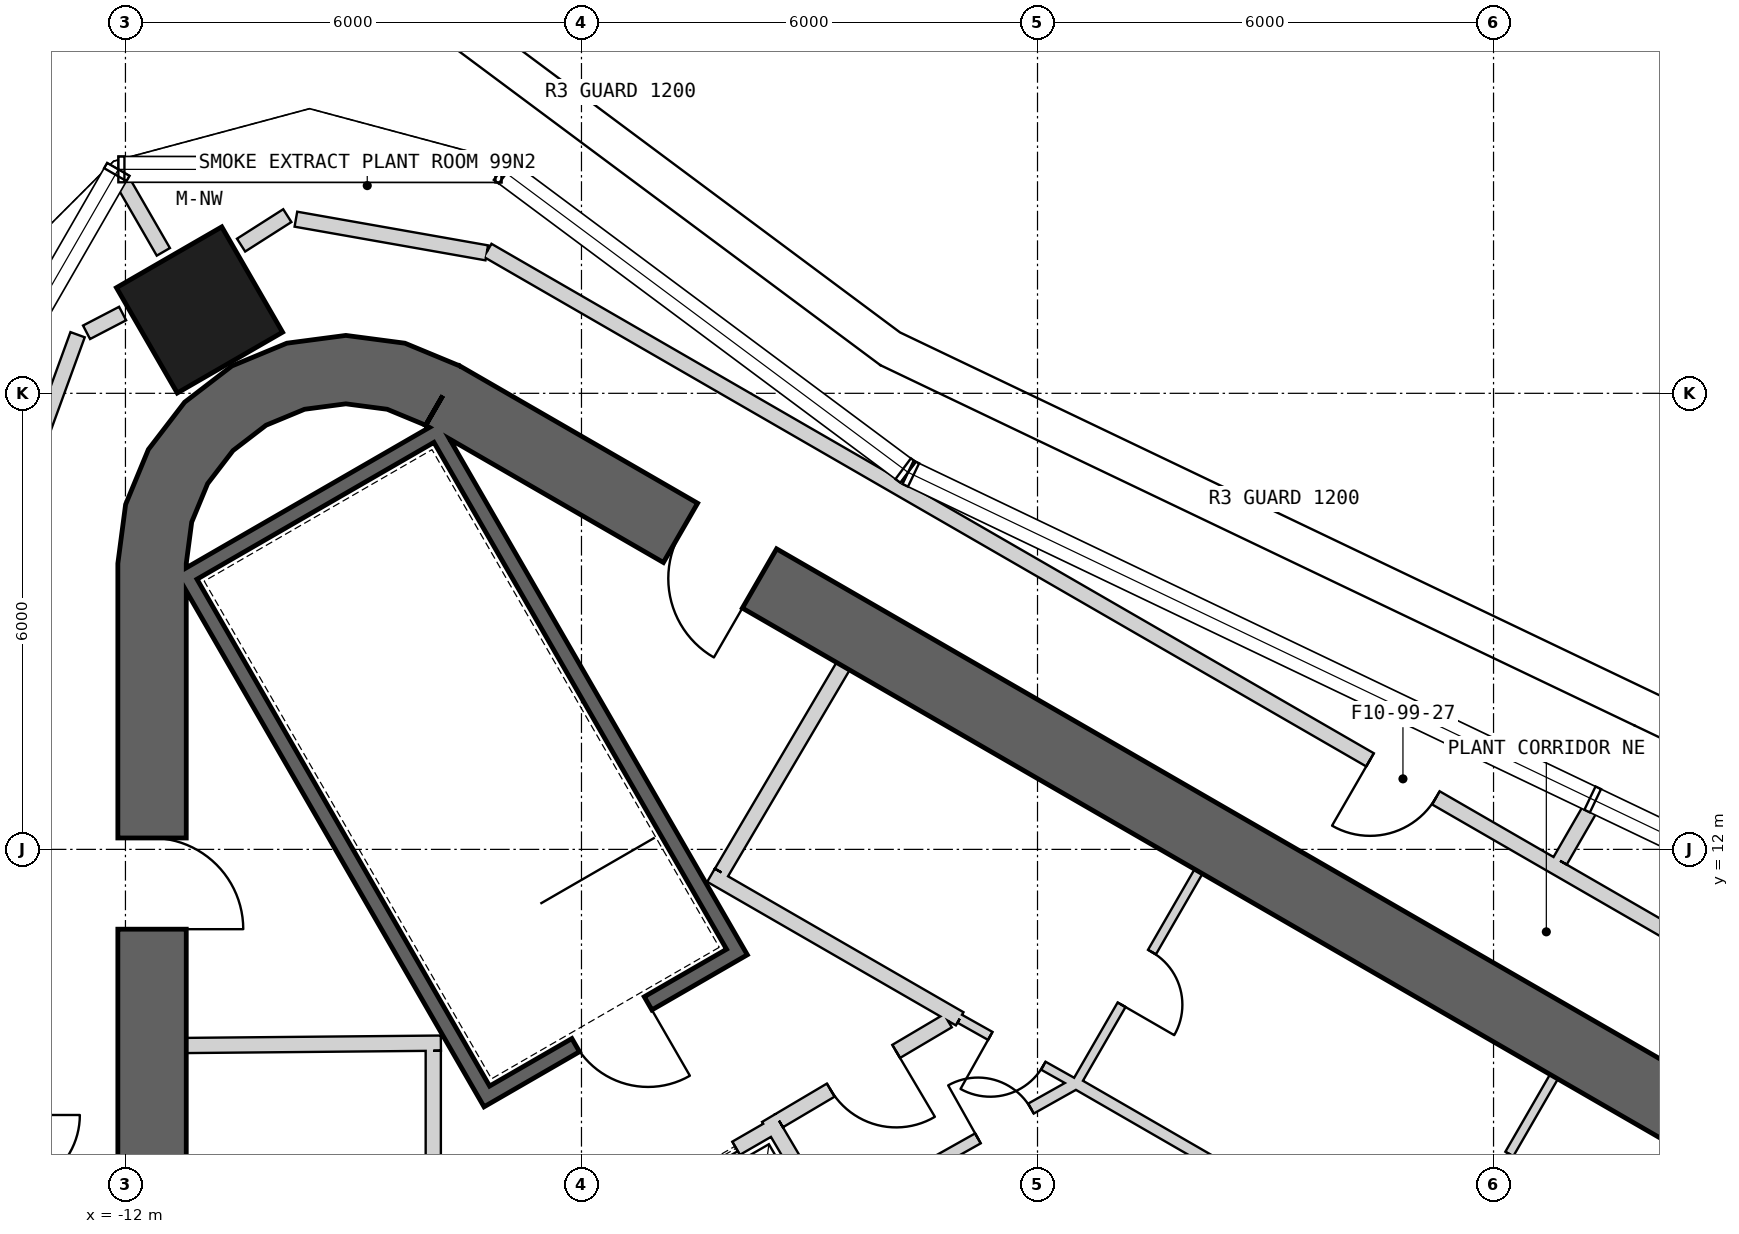
"""IFC4 building model, lengths in metres.
Left out: names, types, materials, properties, quantities, classifications, styles, units other than length and angle.
Written with IfcOpenShell. Run it as: python <this file> out.ifc"""

import sys

from ifc_helpers import new_model, si_unit, direction, frame, frame_2d, origin, origin_2d, place, context, subcontext, project, spatial, polyline, rectangle, outline, extrude, element, fill, save


model = new_model("IFC4")
c1 = context("Model", 3, precision=1e-05, world=origin(), true_north=direction((0.0, 1.0)))
c2 = subcontext(c1, "Body", "Model", "MODEL_VIEW")
j1 = project(units=[si_unit("LENGTHUNIT", "METRE"), si_unit("PLANEANGLEUNIT", "RADIAN")], contexts=[c1])
p1 = place(None, origin())
s1 = spatial("IfcSite", under=j1, at=p1, CompositionType="ELEMENT")
p2 = place(p1, origin())
s2 = spatial("IfcBuilding", under=s1, at=p2, CompositionType="ELEMENT")
p3 = place(p2, frame((0.0, 0.0, 440.3)))
s3 = spatial("IfcBuildingStorey", under=s2, at=p3, CompositionType="ELEMENT", Elevation=440.3)
p4 = place(p3, frame((-11.025, 19.097, 0.0), z_axis=(0.0, 0.0, 1.0), x_axis=(-0.5, 0.866025403784, 0.0)))
e1 = element("IfcColumn", 1, at=p4, inside=s3, PredefinedType="COLUMN", context=c2, shape_type="SweptSolid", body=[
    extrude(rectangle(XDim=1.6, YDim=1.6, at=origin_2d()), origin(), (0.0, 0.0, 1.0), 4.7),
])
p5 = place(p3, frame((19.475, 2.208, 0.0), z_axis=(0.0, 0.0, 1.0), x_axis=(-0.866028369851, 0.499994862586, 0.0)))
e2 = element("IfcWall", 2, at=p5, inside=s3, PredefinedType="SHEAR", context=c2, shape_type="SweptSolid", body=[
    extrude(rectangle(XDim=31.523, YDim=0.9, at=frame_2d((15.762, 0.0))), origin(), (0.0, 0.0, 1.0), 4.7),
])
p6 = place(p5, frame((3.612, 0.0, 0.0)))
e3 = element("IfcOpeningElement", 3, at=p6, cuts=e2, PredefinedType="OPENING", context=c2, shape_type="SweptSolid", body=[
    extrude(rectangle(XDim=1.2, YDim=2.4, at=frame_2d((0.6, 1.2))), frame((0.0, 0.46, 0.0), z_axis=(0.0, -1.0, 0.0), x_axis=(1.0, 0.0, 0.0)), (0.0, 0.0, 1.0), 0.92),
])
p7 = place(p5, frame((26.712, 0.0, 0.0)))
e4 = element("IfcOpeningElement", 4, at=p7, cuts=e2, PredefinedType="OPENING", context=c2, shape_type="SweptSolid", body=[
    extrude(rectangle(XDim=1.2, YDim=2.4, at=frame_2d((0.6, 1.2))), frame((0.0, 0.46, 0.0), z_axis=(0.0, -1.0, 0.0), x_axis=(1.0, 0.0, 0.0)), (0.0, 0.0, 1.0), 0.92),
])
p8 = place(p3, frame((-11.65, 15.762, 0.0), z_axis=(0.0, 0.0, 1.0), x_axis=(0.0, -1.0, 0.0)))
e5 = element("IfcWall", 5, at=p8, inside=s3, PredefinedType="SHEAR", context=c2, shape_type="SweptSolid", body=[
    extrude(rectangle(XDim=31.523, YDim=0.9, at=frame_2d((15.762, 0.0))), origin(), (0.0, 0.0, 1.0), 4.7),
])
p9 = place(p8, frame((3.612, 0.0, 0.0)))
e6 = element("IfcOpeningElement", 6, at=p9, cuts=e5, PredefinedType="OPENING", context=c2, shape_type="SweptSolid", body=[
    extrude(rectangle(XDim=1.2, YDim=2.4, at=frame_2d((0.6, 1.2))), frame((0.0, 0.46, 0.0), z_axis=(0.0, -1.0, 0.0), x_axis=(1.0, 0.0, 0.0)), (0.0, 0.0, 1.0), 0.92),
])
p10 = place(p8, frame((26.712, 0.0, 0.0)))
e7 = element("IfcOpeningElement", 7, at=p10, cuts=e5, PredefinedType="OPENING", context=c2, shape_type="SweptSolid", body=[
    extrude(rectangle(XDim=1.2, YDim=2.4, at=frame_2d((0.6, 1.2))), frame((0.0, 0.46, 0.0), z_axis=(0.0, -1.0, 0.0), x_axis=(1.0, 0.0, 0.0)), (0.0, 0.0, 1.0), 0.92),
])
p11 = place(p3, origin())
e8 = element("IfcWall", 8, at=p11, inside=s3, PredefinedType="SHEAR", context=c2, shape_type="SweptSolid", body=[
    extrude(outline(polyline([(-7.6, 18.36), (-8.323, 18.659), (-9.1, 18.762), (-9.876, 18.659), (-10.6, 18.36), (-11.221, 17.883), (-11.698, 17.262), (-11.998, 16.538), (-12.1, 15.762), (-11.2, 15.762), (-11.128, 16.305), (-10.919, 16.812), (-10.585, 17.247), (-10.15, 17.58), (-9.644, 17.79), (-9.1, 17.862), (-8.556, 17.79), (-8.05, 17.58), (-7.6, 18.36)])), origin(), (0.0, 0.0, 1.0), 4.7),
])
p12 = place(p3, frame((-11.245, 15.678, -0.25), z_axis=(0.0, 0.0, 1.0), x_axis=(0.499977274689, -0.866038523851, 0.0)))
e9 = element("IfcWall", 9, at=p12, inside=s3, PredefinedType="SHEAR", context=c2, shape_type="SweptSolid", body=[
    extrude(rectangle(XDim=8.1, YDim=0.2, at=frame_2d((4.05, 0.0))), origin(), (0.0, 0.0, 1.0), 4.95),
])
p13 = place(p3, frame((-7.818, 17.541, -0.25), z_axis=(0.0, 0.0, 1.0), x_axis=(-0.866044365799, -0.499967155389, 0.0)))
e10 = element("IfcWall", 10, at=p13, inside=s3, PredefinedType="SHEAR", context=c2, shape_type="SweptSolid", body=[
    extrude(rectangle(XDim=3.8, YDim=0.2, at=frame_2d((1.9, 0.0))), origin(), (0.0, 0.0, 1.0), 4.95),
])
p14 = place(p3, frame((-7.854, 17.405, -0.25), z_axis=(0.0, 0.0, 1.0), x_axis=(0.499997992926, -0.866026562566, 0.0)))
e11 = element("IfcWall", 11, at=p14, inside=s3, PredefinedType="SHEAR", context=c2, shape_type="SweptSolid", body=[
    extrude(rectangle(XDim=7.9, YDim=0.2, at=frame_2d((3.95, 0.0))), origin(), (0.0, 0.0, 1.0), 4.95),
])
p15 = place(p3, frame((-7.159, 8.8, -0.25), z_axis=(0.0, 0.0, 1.0), x_axis=(0.866047807691, 0.499961193289, 0.0)))
e12 = element("IfcWall", 12, at=p15, inside=s3, PredefinedType="SHEAR", context=c2, shape_type="SweptSolid", body=[
    extrude(rectangle(XDim=3.6, YDim=0.2, at=frame_2d((1.8, 0.0))), origin(), (0.0, 0.0, 1.0), 4.95),
])
p16 = place(p15, frame((1.25, 0.0, 0.25)))
e13 = element("IfcOpeningElement", 13, at=p16, cuts=e12, PredefinedType="OPENING", context=c2, shape_type="SweptSolid", body=[
    extrude(rectangle(XDim=1.1, YDim=2.1, at=frame_2d((0.55, 1.05))), frame((0.0, 0.11, 0.0), z_axis=(0.0, -1.0, 0.0), x_axis=(1.0, 0.0, 0.0)), (0.0, 0.0, 1.0), 0.22),
])
p17 = place(p3, frame((-5.524, 7.168, 0.0), z_axis=(0.0, 0.0, 1.0), x_axis=(0.866024647952, 0.500001309137, 0.0)))
e14 = element("IfcWall", 14, at=p17, inside=s3, PredefinedType="PLUMBINGWALL", context=c2, shape_type="SweptSolid", body=[
    extrude(rectangle(XDim=2.4, YDim=0.2, at=frame_2d((1.2, 0.0))), origin(), (0.0, 0.0, 1.0), 4.7),
])
p18 = place(p17, frame((0.6, 0.0, 0.0)))
e15 = element("IfcOpeningElement", 15, at=p18, cuts=e14, PredefinedType="OPENING", context=c2, shape_type="SweptSolid", body=[
    extrude(rectangle(XDim=1.2, YDim=2.4, at=frame_2d((0.6, 1.2))), frame((0.0, 0.11, 0.0), z_axis=(0.0, -1.0, 0.0), x_axis=(1.0, 0.0, 0.0)), (0.0, 0.0, 1.0), 0.22),
])
p19 = place(p3, frame((-3.538, 8.465, 0.0), z_axis=(0.0, 0.0, 1.0), x_axis=(0.508616218331, -0.860993346345, 0.0)))
e16 = element("IfcWall", 16, at=p19, inside=s3, PredefinedType="PLUMBINGWALL", context=c2, shape_type="SweptSolid", body=[
    extrude(rectangle(XDim=3.2, YDim=0.2, at=frame_2d((1.6, 0.0))), origin(), (0.0, 0.0, 1.0), 4.7),
])
p20 = place(p3, frame((-7.85, 9.451, 0.0), z_axis=(0.0, 0.0, 1.0), x_axis=(-0.999957167047, -0.009255488683, 0.0)))
e17 = element("IfcWall", 17, at=p20, inside=s3, PredefinedType="PARTITIONING", context=c2, shape_type="SweptSolid", body=[
    extrude(rectangle(XDim=3.35, YDim=0.2, at=frame_2d((1.675, 0.0))), origin(), (0.0, 0.0, 1.0), 4.7),
])
p21 = place(p3, frame((-7.95, 5.772, 0.0), z_axis=(0.0, 0.0, 1.0), x_axis=(0.0, 1.0, 0.0)))
e18 = element("IfcWall", 18, at=p21, inside=s3, PredefinedType="PARTITIONING", context=c2, shape_type="SweptSolid", body=[
    extrude(rectangle(XDim=3.578, YDim=0.2, at=frame_2d((1.789, 0.0))), origin(), (0.0, 0.0, 1.0), 4.7),
])
p22 = place(p21, frame((1.389, 0.0, 0.0)))
e19 = element("IfcOpeningElement", 19, at=p22, cuts=e18, PredefinedType="OPENING", context=c2, shape_type="SweptSolid", body=[
    extrude(rectangle(XDim=0.8, YDim=2.1, at=frame_2d((0.4, 1.05))), frame((0.0, 0.11, 0.0), z_axis=(0.0, -1.0, 0.0), x_axis=(1.0, 0.0, 0.0)), (0.0, 0.0, 1.0), 0.22),
])
p23 = place(p3, frame((6.795, 9.01, 0.0), z_axis=(0.0, 0.0, 1.0), x_axis=(-0.499984717929, -0.866034226713, 0.0)))
e20 = element("IfcWall", 20, at=p23, inside=s3, PredefinedType="PARTITIONING", context=c2, shape_type="SweptSolid", body=[
    extrude(rectangle(XDim=3.25, YDim=0.12, at=frame_2d((1.625, 0.0))), origin(), (0.0, 0.0, 1.0), 4.7),
])
p24 = place(p23, frame((1.175, 0.0, 0.0)))
e21 = element("IfcOpeningElement", 21, at=p24, cuts=e20, PredefinedType="OPENING", context=c2, shape_type="SweptSolid", body=[
    extrude(rectangle(XDim=0.9, YDim=2.1, at=frame_2d((0.45, 1.05))), frame((0.0, 0.07, 0.0), z_axis=(0.0, -1.0, 0.0), x_axis=(1.0, 0.0, 0.0)), (0.0, 0.0, 1.0), 0.14),
])
p25 = place(p3, frame((-4.296, 11.66, 0.0), z_axis=(0.0, 0.0, 1.0), x_axis=(0.866027389382, -0.499996560828, 0.0)))
e22 = element("IfcWall", 22, at=p25, inside=s3, PredefinedType="PARTITIONING", context=c2, shape_type="SweptSolid", body=[
    extrude(rectangle(XDim=3.778, YDim=0.2, at=frame_2d((1.889, 0.0))), origin(), (0.0, 0.0, 1.0), 4.7),
])
p26 = place(p3, frame((2.119, 11.709, 0.0), z_axis=(0.0, 0.0, 1.0), x_axis=(-0.500017246033, -0.866015446554, 0.0)))
e23 = element("IfcWall", 23, at=p26, inside=s3, PredefinedType="PARTITIONING", context=c2, shape_type="SweptSolid", body=[
    extrude(rectangle(XDim=3.25, YDim=0.12, at=frame_2d((1.625, 0.0))), origin(), (0.0, 0.0, 1.0), 4.7),
])
p27 = place(p26, frame((1.225, 0.0, 0.0)))
e24 = element("IfcOpeningElement", 24, at=p27, cuts=e23, PredefinedType="OPENING", context=c2, shape_type="SweptSolid", body=[
    extrude(rectangle(XDim=0.8, YDim=2.1, at=frame_2d((0.4, 1.05))), frame((0.0, 0.07, 0.0), z_axis=(0.0, -1.0, 0.0), x_axis=(1.0, 0.0, 0.0)), (0.0, 0.0, 1.0), 0.14),
])
p28 = place(p3, frame((5.159, 6.236, 0.0), z_axis=(0.0, 0.0, 1.0), x_axis=(-0.866028230842, 0.499995103361, 0.0)))
e25 = element("IfcWall", 25, at=p28, inside=s3, PredefinedType="PLUMBINGWALL", context=c2, shape_type="SweptSolid", body=[
    extrude(rectangle(XDim=5.4, YDim=0.15, at=frame_2d((2.7, 0.0))), origin(), (0.0, 0.0, 1.0), 4.7),
])
p29 = place(p28, frame((2.3, 0.0, 0.0)))
e26 = element("IfcOpeningElement", 26, at=p29, cuts=e25, PredefinedType="OPENING", context=c2, shape_type="SweptSolid", body=[
    extrude(rectangle(XDim=0.8, YDim=2.1, at=frame_2d((0.4, 1.05))), frame((0.0, 0.085, 0.0), z_axis=(0.0, -1.0, 0.0), x_axis=(1.0, 0.0, 0.0)), (0.0, 0.0, 1.0), 0.17),
])
p30 = place(p3, frame((-2.558, 14.409, 0.0), z_axis=(0.0, 0.0, 1.0), x_axis=(-0.508018930956, -0.861345903683, 0.0)))
e27 = element("IfcWall", 27, at=p30, inside=s3, PredefinedType="PARTITIONING", context=c2, shape_type="SweptSolid", body=[
    extrude(rectangle(XDim=3.15, YDim=0.2, at=frame_2d((1.575, 0.0))), origin(), (0.0, 0.0, 1.0), 4.7),
])
p31 = place(p3, frame((-1.024, 9.772, 0.0), z_axis=(0.0, 0.0, 1.0), x_axis=(0.871968924608, -0.489561226527, 0.0)))
e28 = element("IfcWall", 28, at=p31, inside=s3, PredefinedType="PARTITIONING", context=c2, shape_type="SweptSolid", body=[
    extrude(rectangle(XDim=1.722, YDim=0.12, at=frame_2d((0.861, 0.0))), origin(), (0.0, 0.0, 1.0), 4.7),
])
p32 = place(p31, frame((0.461, 0.0, 0.0)))
e29 = element("IfcOpeningElement", 29, at=p32, cuts=e28, PredefinedType="OPENING", context=c2, shape_type="SweptSolid", body=[
    extrude(rectangle(XDim=0.8, YDim=2.1, at=frame_2d((0.4, 1.05))), frame((0.0, 0.07, 0.0), z_axis=(0.0, -1.0, 0.0), x_axis=(1.0, 0.0, 0.0)), (0.0, 0.0, 1.0), 0.14),
])
p33 = place(p3, frame((-1.179, 9.745, 0.0), z_axis=(0.0, 0.0, 1.0), x_axis=(-0.860630814782, -0.509229418482, 0.0)))
e30 = element("IfcWall", 30, at=p33, inside=s3, PredefinedType="PARTITIONING", context=c2, shape_type="SweptSolid", body=[
    extrude(rectangle(XDim=2.582, YDim=0.2, at=frame_2d((1.291, 0.0))), origin(), (0.0, 0.0, 1.0), 4.7),
])
p34 = place(p33, frame((0.791, 0.0, 0.0)))
e31 = element("IfcOpeningElement", 31, at=p34, cuts=e30, PredefinedType="OPENING", context=c2, shape_type="SweptSolid", body=[
    extrude(rectangle(XDim=1.0, YDim=2.1, at=frame_2d((0.5, 1.05))), frame((0.0, 0.11, 0.0), z_axis=(0.0, -1.0, 0.0), x_axis=(1.0, 0.0, 0.0)), (0.0, 0.0, 1.0), 0.22),
])
p35 = place(p3, frame((0.475, 8.905, 0.0), z_axis=(0.0, 0.0, 1.0), x_axis=(-0.871859457225, -0.489756150392, 0.0)))
e32 = element("IfcWall", 32, at=p35, inside=s3, PredefinedType="PLUMBINGWALL", context=c2, shape_type="SweptSolid", body=[
    extrude(rectangle(XDim=2.089, YDim=0.15, at=frame_2d((1.044, 0.0))), origin(), (0.0, 0.0, 1.0), 4.7),
])
p36 = place(p35, frame((0.644, 0.0, 0.0)))
e33 = element("IfcOpeningElement", 33, at=p36, cuts=e32, PredefinedType="OPENING", context=c2, shape_type="SweptSolid", body=[
    extrude(rectangle(XDim=0.8, YDim=2.1, at=frame_2d((0.4, 1.05))), frame((0.0, 0.085, 0.0), z_axis=(0.0, -1.0, 0.0), x_axis=(1.0, 0.0, 0.0)), (0.0, 0.0, 1.0), 0.17),
])
p37 = place(p3, frame((-12.63, 18.771, 0.0), z_axis=(0.0, 0.0, 1.0), x_axis=(-0.342015224264, -0.939694411163, 0.0)))
e34 = element("IfcWall", 34, at=p37, inside=s3, PredefinedType="PARTITIONING", context=c2, shape_type="SweptSolid", body=[
    extrude(rectangle(XDim=2.737, YDim=0.2, at=frame_2d((1.368, 0.0))), origin(), (0.0, 0.0, 1.0), 4.7),
])
p38 = place(p3, frame((-12.038, 19.05, 0.0), z_axis=(0.0, 0.0, 1.0), x_axis=(-0.887186880255, -0.461410272429, 0.0)))
e35 = element("IfcWall", 35, at=p38, inside=s3, PredefinedType="PARTITIONING", context=c2, shape_type="SweptSolid", body=[
    extrude(rectangle(XDim=0.534, YDim=0.2, at=frame_2d((0.267, 0.0))), origin(), (0.0, 0.0, 1.0), 4.7),
])
p39 = place(p3, frame((-11.501, 19.861, 0.0), z_axis=(0.0, 0.0, 1.0), x_axis=(-0.500107244371, 0.865963477364, 0.0)))
e36 = element("IfcWall", 36, at=p39, inside=s3, PredefinedType="PARTITIONING", context=c2, shape_type="SweptSolid", body=[
    extrude(rectangle(XDim=1.098, YDim=0.2, at=frame_2d((0.549, 0.0))), origin(), (0.0, 0.0, 1.0), 4.7),
])
p40 = place(p3, frame((20.834, 3.675, 0.0), z_axis=(0.0, 0.0, 1.0), x_axis=(-0.866028536494, 0.499994573949, 0.0)))
e37 = element("IfcWall", 37, at=p40, inside=s3, PredefinedType="PARTITIONING", context=c2, shape_type="SweptSolid", body=[
    extrude(rectangle(XDim=32.411, YDim=0.2, at=frame_2d((16.206, 0.0))), origin(), (0.0, 0.0, 1.0), 4.7),
])
p41 = place(p40, frame((7.7, 0.0, 0.0)))
e38 = element("IfcOpeningElement", 38, at=p41, cuts=e37, PredefinedType="OPENING", context=c2, shape_type="SweptSolid", body=[
    extrude(rectangle(XDim=1.0, YDim=2.1, at=frame_2d((0.5, 1.05))), frame((0.0, 0.11, 0.0), z_axis=(0.0, -1.0, 0.0), x_axis=(1.0, 0.0, 0.0)), (0.0, 0.0, 1.0), 0.22),
])
p42 = place(p40, frame((18.006, 0.0, 0.0)))
e39 = element("IfcOpeningElement", 39, at=p42, cuts=e37, PredefinedType="OPENING", context=c2, shape_type="SweptSolid", body=[
    extrude(rectangle(XDim=1.0, YDim=2.1, at=frame_2d((0.5, 1.05))), frame((0.0, 0.11, 0.0), z_axis=(0.0, -1.0, 0.0), x_axis=(1.0, 0.0, 0.0)), (0.0, 0.0, 1.0), 0.22),
])
p43 = place(p3, frame((-9.87, 20.337, 0.0), z_axis=(0.0, 0.0, 1.0), x_axis=(-0.843326891705, -0.537400924569, 0.0)))
e40 = element("IfcWall", 40, at=p43, inside=s3, PredefinedType="PARTITIONING", context=c2, shape_type="SweptSolid", body=[
    extrude(rectangle(XDim=0.721, YDim=0.2, at=frame_2d((0.361, 0.0))), origin(), (0.0, 0.0, 1.0), 4.7),
])
p44 = place(p3, frame((-7.246, 19.848, 0.0), z_axis=(0.0, 0.0, 1.0), x_axis=(-0.984816315713, 0.173599609177, 0.0)))
e41 = element("IfcWall", 41, at=p44, inside=s3, PredefinedType="PARTITIONING", context=c2, shape_type="SweptSolid", body=[
    extrude(rectangle(XDim=2.55, YDim=0.2, at=frame_2d((1.275, 0.0))), origin(), (0.0, 0.0, 1.0), 4.7),
])
p45 = place(p3, frame((7.271, 12.534, 0.0), z_axis=(0.0, 0.0, 1.0), x_axis=(-0.500025443912, -0.866010713236, 0.0)))
e42 = element("IfcWall", 42, at=p45, inside=s3, PredefinedType="PARTITIONING", context=c2, shape_type="SweptSolid", body=[
    extrude(rectangle(XDim=0.791, YDim=0.2, at=frame_2d((0.395, 0.0))), origin(), (0.0, 0.0, 1.0), 4.7),
])
p46 = place(p16, origin())
e43 = element("IfcDoor", 43, at=p46, inside=s3, OperationType="SINGLE_SWING_RIGHT", PredefinedType="USERDEFINED", context=c2, shape_type="SweptSolid", body=[
    extrude(rectangle(XDim=1.1, YDim=2.1, at=frame_2d((0.55, 1.05))), frame((0.0, 0.025, 0.0), z_axis=(0.0, -1.0, 0.0), x_axis=(1.0, 0.0, 0.0)), (0.0, 0.0, 1.0), 0.05),
])
fill(e13, e43)
p47 = place(p34, origin())
e44 = element("IfcDoor", 44, at=p47, inside=s3, OperationType="SINGLE_SWING_LEFT", PredefinedType="USERDEFINED", context=c2, shape_type="SweptSolid", body=[
    extrude(rectangle(XDim=1.0, YDim=2.1, at=frame_2d((0.5, 1.05))), frame((0.0, 0.025, 0.0), z_axis=(0.0, -1.0, 0.0), x_axis=(1.0, 0.0, 0.0)), (0.0, 0.0, 1.0), 0.05),
])
fill(e31, e44)
p48 = place(p18, origin())
e45 = element("IfcDoor", 45, at=p48, inside=s3, OperationType="SLIDING_TO_LEFT", PredefinedType="USERDEFINED", context=c2, shape_type="SweptSolid", body=[
    extrude(rectangle(XDim=1.2, YDim=2.4, at=frame_2d((0.6, 1.2))), frame((0.0, 0.025, 0.0), z_axis=(0.0, -1.0, 0.0), x_axis=(1.0, 0.0, 0.0)), (0.0, 0.0, 1.0), 0.05),
])
fill(e15, e45)
p49 = place(p36, origin())
e46 = element("IfcDoor", 46, at=p49, inside=s3, OperationType="SINGLE_SWING_RIGHT", PredefinedType="USERDEFINED", context=c2, shape_type="SweptSolid", body=[
    extrude(rectangle(XDim=0.8, YDim=2.1, at=frame_2d((0.4, 1.05))), frame((0.0, 0.025, 0.0), z_axis=(0.0, -1.0, 0.0), x_axis=(1.0, 0.0, 0.0)), (0.0, 0.0, 1.0), 0.05),
])
fill(e33, e46)
p50 = place(p27, origin())
e47 = element("IfcDoor", 47, at=p50, inside=s3, OperationType="SINGLE_SWING_RIGHT", PredefinedType="USERDEFINED", context=c2, shape_type="SweptSolid", body=[
    extrude(rectangle(XDim=0.8, YDim=2.1, at=frame_2d((0.4, 1.05))), frame((0.0, 0.025, 0.0), z_axis=(0.0, -1.0, 0.0), x_axis=(1.0, 0.0, 0.0)), (0.0, 0.0, 1.0), 0.05),
])
fill(e24, e47)
p51 = place(p32, origin())
e48 = element("IfcDoor", 48, at=p51, inside=s3, OperationType="SINGLE_SWING_LEFT", PredefinedType="USERDEFINED", context=c2, shape_type="SweptSolid", body=[
    extrude(rectangle(XDim=0.8, YDim=2.1, at=frame_2d((0.4, 1.05))), frame((0.0, 0.025, 0.0), z_axis=(0.0, -1.0, 0.0), x_axis=(1.0, 0.0, 0.0)), (0.0, 0.0, 1.0), 0.05),
])
fill(e29, e48)
p52 = place(p42, origin())
e49 = element("IfcDoor", 49, at=p52, inside=s3, OperationType="SINGLE_SWING_RIGHT", PredefinedType="USERDEFINED", context=c2, shape_type="SweptSolid", body=[
    extrude(rectangle(XDim=1.0, YDim=2.1, at=frame_2d((0.5, 1.05))), frame((0.0, 0.025, 0.0), z_axis=(0.0, -1.0, 0.0), x_axis=(1.0, 0.0, 0.0)), (0.0, 0.0, 1.0), 0.05),
])
fill(e39, e49)
p53 = place(p24, origin())
e50 = element("IfcDoor", 50, at=p53, inside=s3, OperationType="SINGLE_SWING_RIGHT", PredefinedType="NOTDEFINED", context=c2, shape_type="SweptSolid", body=[
    extrude(rectangle(XDim=0.9, YDim=2.1, at=frame_2d((0.45, 1.05))), frame((0.0, 0.025, 0.0), z_axis=(0.0, -1.0, 0.0), x_axis=(1.0, 0.0, 0.0)), (0.0, 0.0, 1.0), 0.05),
])
fill(e21, e50)
p54 = place(p7, origin())
e51 = element("IfcDoor", 51, at=p54, inside=s3, OperationType="SINGLE_SWING_LEFT", PredefinedType="USERDEFINED", context=c2, shape_type="SweptSolid", body=[
    extrude(rectangle(XDim=1.2, YDim=2.4, at=frame_2d((0.6, 1.2))), frame((0.0, 0.025, 0.0), z_axis=(0.0, -1.0, 0.0), x_axis=(1.0, 0.0, 0.0)), (0.0, 0.0, 1.0), 0.05),
])
fill(e4, e51)
p55 = place(p9, origin())
e52 = element("IfcDoor", 52, at=p55, inside=s3, OperationType="SINGLE_SWING_RIGHT", PredefinedType="USERDEFINED", context=c2, shape_type="SweptSolid", body=[
    extrude(rectangle(XDim=1.2, YDim=2.4, at=frame_2d((0.6, 1.2))), frame((0.0, 0.025, 0.0), z_axis=(0.0, -1.0, 0.0), x_axis=(1.0, 0.0, 0.0)), (0.0, 0.0, 1.0), 0.05),
])
fill(e6, e52)
save(model, sys.argv[1])
